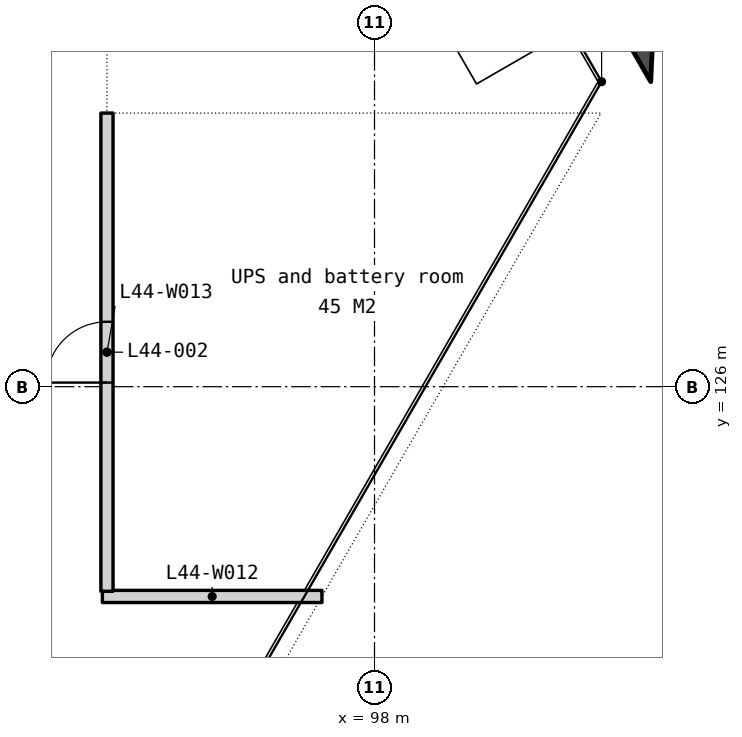
"""IFC4 building model, lengths in metres.
Left out: names, types, materials, properties, quantities, classifications, styles, units other than length and angle.
Written with IfcOpenShell. Run it as: python <this file> out.ifc"""

import sys

from ifc_helpers import new_model, si_unit, direction, frame, frame_2d, origin, place, context, subcontext, project, spatial, polyline, rectangle, outline, extrude, element, fill, save


model = new_model("IFC4")
c1 = context("Model", 3, precision=1e-05, world=origin(), true_north=direction((0.0, 1.0)))
c2 = subcontext(c1, "Body", "Model", "MODEL_VIEW")
j1 = project(units=[si_unit("LENGTHUNIT", "METRE"), si_unit("PLANEANGLEUNIT", "RADIAN")], contexts=[c1])
p1 = place(None, origin())
s1 = spatial("IfcSite", under=j1, at=p1, CompositionType="ELEMENT")
p2 = place(p1, origin())
s2 = spatial("IfcBuilding", under=s1, at=p2, CompositionType="ELEMENT")
p3 = place(p2, frame((0.0, 0.0, 175.4)))
s3 = spatial("IfcBuildingStorey", under=s2, at=p3, CompositionType="ELEMENT", Elevation=175.4)
p4 = place(p3, frame((0.0, 0.0, -0.25)))
e1 = element("IfcWall", 1, at=p4, inside=s3, PredefinedType="SOLIDWALL", context=c2, shape_type="SweptSolid", body=[
    extrude(outline(polyline([(102.543, 131.016), (102.681, 134.088), (100.243, 135.0), (102.543, 131.016)])), origin(), (0.0, 0.0, 1.0), 4.6),
])
p5 = place(p3, frame((93.525, 122.55, 0.0), z_axis=(0.0, 0.0, 1.0), x_axis=(1.0, 0.0, 0.0)))
e2 = element("IfcWall", 2, at=p5, inside=s3, PredefinedType="PARTITIONING", context=c2, shape_type="SweptSolid", body=[
    extrude(rectangle(XDim=3.611, YDim=0.2, at=frame_2d((1.805, 0.0))), origin(), (0.0, 0.0, 1.0), 4.35),
])
p6 = place(p3, frame((93.6, 122.635, 0.0), z_axis=(0.0, 0.0, 1.0), x_axis=(0.0, 1.0, 0.0)))
e3 = element("IfcWall", 3, at=p6, inside=s3, PredefinedType="PARTITIONING", context=c2, shape_type="SweptSolid", body=[
    extrude(rectangle(XDim=7.865, YDim=0.2, at=frame_2d((3.933, 0.0))), origin(), (0.0, 0.0, 1.0), 4.35),
])
p7 = place(p6, frame((3.433, 0.0, 0.0)))
e4 = element("IfcOpeningElement", 4, at=p7, cuts=e3, PredefinedType="OPENING", context=c2, shape_type="SweptSolid", body=[
    extrude(rectangle(XDim=1.0, YDim=2.1, at=frame_2d((0.5, 1.05))), frame((0.0, 0.11, 0.0), z_axis=(0.0, -1.0, 0.0), x_axis=(1.0, 0.0, 0.0)), (0.0, 0.0, 1.0), 0.22),
])
p8 = place(p7, origin())
e5 = element("IfcDoor", 5, at=p8, inside=s3, OperationType="SINGLE_SWING_LEFT", PredefinedType="DOOR", context=c2, shape_type="SweptSolid", body=[
    extrude(rectangle(XDim=1.0, YDim=2.1, at=frame_2d((0.5, 1.05))), frame((0.0, 0.025, 0.0), z_axis=(0.0, -1.0, 0.0), x_axis=(1.0, 0.0, 0.0)), (0.0, 0.0, 1.0), 0.05),
])
fill(e4, e5)
save(model, sys.argv[1])
